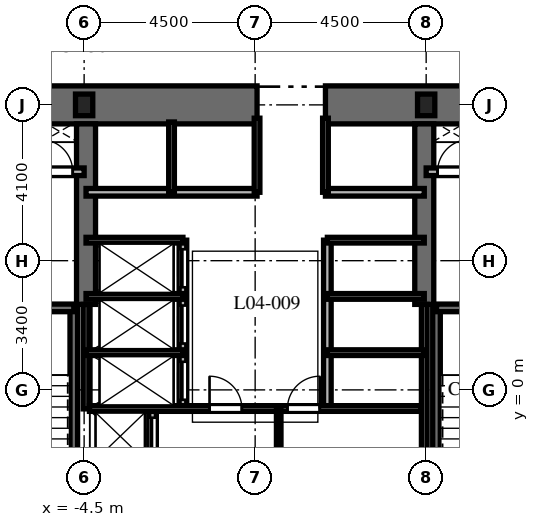
"""IFC4 building model, lengths in metres.
Left out: names, types, materials, properties, quantities, classifications, styles, units other than length and angle.
Written with IfcOpenShell. Run it as: python <this file> out.ifc"""

import sys

from ifc_helpers import new_model, si_unit, direction, frame, frame_2d, origin, origin_2d, place, context, subcontext, project, spatial, rectangle, i_section, extrude, element, fill, save


model = new_model("IFC4")
c1 = context("Model", 3, precision=1e-05, world=origin(), true_north=direction((0.0, 1.0)))
c2 = subcontext(c1, "Body", "Model", "MODEL_VIEW")
j1 = project(units=[si_unit("LENGTHUNIT", "METRE"), si_unit("PLANEANGLEUNIT", "RADIAN")], contexts=[c1])
p1 = place(None, origin())
s1 = spatial("IfcSite", under=j1, at=p1, CompositionType="ELEMENT")
p2 = place(p1, origin())
s2 = spatial("IfcBuilding", under=s1, at=p2, CompositionType="ELEMENT")
p3 = place(p2, frame((0.0, 0.0, 23.4)))
s3 = spatial("IfcBuildingStorey", under=s2, at=p3, CompositionType="ELEMENT", Elevation=23.4)
p4 = place(p3, frame((-9.5, 7.5, 0.0), z_axis=(0.0, 0.0, 1.0), x_axis=(1.0, 0.0, 0.0)))
e1 = element("IfcWall", 1, at=p4, inside=s3, PredefinedType="SHEAR", context=c2, shape_type="SweptSolid", body=[
    extrude(rectangle(XDim=9.55, YDim=1.0, at=frame_2d((4.775, 0.0))), origin(), (0.0, 0.0, 1.0), 4.8),
])
p5 = place(p3, frame((1.85, 7.5, 0.0), z_axis=(0.0, 0.0, 1.0), x_axis=(1.0, 0.0, 0.0)))
e2 = element("IfcWall", 2, at=p5, inside=s3, PredefinedType="SHEAR", context=c2, shape_type="SweptSolid", body=[
    extrude(rectangle(XDim=7.65, YDim=1.0, at=frame_2d((3.825, 0.0))), origin(), (0.0, 0.0, 1.0), 4.8),
])
for number, where, z_axis, x_axis in (
    (3, (-4.45, 2.25, 0.0), (0.0, 0.0, 1.0), (0.0, 1.0, 0.0)),
    (4, (4.45, 2.25, 0.0), (0.0, 0.0, 1.0), (0.0, 1.0, 0.0)),
):
    element("IfcWall", number, at=place(p3, frame(where, z_axis=z_axis, x_axis=x_axis)), inside=s3, PredefinedType="SHEAR", context=c2, shape_type="SweptSolid", body=[
        extrude(rectangle(XDim=4.75, YDim=0.5, at=frame_2d((2.375, 0.0))), origin(), (0.0, 0.0, 1.0), 4.8),
    ])
p6 = place(p3, frame((-4.772, -6.985, 0.0), z_axis=(0.0, 0.0, 1.0), x_axis=(0.0, 1.0, 0.0)))
e5 = element("IfcWall", 5, at=p6, inside=s3, PredefinedType="SHEAR", context=c2, shape_type="SweptSolid", body=[
    extrude(rectangle(XDim=9.143, YDim=0.2, at=frame_2d((4.572, 0.0))), origin(), (0.0, 0.0, 1.0), 4.8),
])
p7 = place(p3, frame((-8.458, 2.158, 0.0), z_axis=(0.0, 0.0, 1.0), x_axis=(1.0, 0.0, 0.0)))
e6 = element("IfcWall", 6, at=p7, inside=s3, PredefinedType="SHEAR", context=c2, shape_type="SweptSolid", body=[
    extrude(rectangle(XDim=3.686, YDim=0.2, at=frame_2d((1.843, 0.0))), origin(), (0.0, 0.0, 1.0), 4.8),
])
p8 = place(p7, frame((1.3, 0.0, 0.0)))
e7 = element("IfcOpeningElement", 7, at=p8, cuts=e6, PredefinedType="OPENING", context=c2, shape_type="SweptSolid", body=[
    extrude(rectangle(XDim=1.0, YDim=2.15, at=frame_2d((0.5, 1.075))), frame((0.0, 0.11, 0.0), z_axis=(0.0, -1.0, 0.0), x_axis=(1.0, 0.0, 0.0)), (0.0, 0.0, 1.0), 0.22),
])
p9 = place(p3, frame((4.772, -6.985, 0.0), z_axis=(0.0, 0.0, 1.0), x_axis=(0.0, 1.0, 0.0)))
e8 = element("IfcWall", 8, at=p9, inside=s3, PredefinedType="SHEAR", context=c2, shape_type="SweptSolid", body=[
    extrude(rectangle(XDim=9.143, YDim=0.2, at=frame_2d((4.572, 0.0))), origin(), (0.0, 0.0, 1.0), 4.8),
])
p10 = place(p3, frame((4.772, 2.158, 0.0), z_axis=(0.0, 0.0, 1.0), x_axis=(1.0, 0.0, 0.0)))
e9 = element("IfcWall", 9, at=p10, inside=s3, PredefinedType="SHEAR", context=c2, shape_type="SweptSolid", body=[
    extrude(rectangle(XDim=3.686, YDim=0.2, at=frame_2d((1.843, 0.0))), origin(), (0.0, 0.0, 1.0), 4.8),
])
p11 = place(p10, frame((1.35, 0.0, 0.0)))
e10 = element("IfcOpeningElement", 10, at=p11, cuts=e9, PredefinedType="OPENING", context=c2, shape_type="SweptSolid", body=[
    extrude(rectangle(XDim=1.0, YDim=2.15, at=frame_2d((0.5, 1.075))), frame((0.0, 0.11, 0.0), z_axis=(0.0, -1.0, 0.0), x_axis=(1.0, 0.0, 0.0)), (0.0, 0.0, 1.0), 0.22),
])
for number, where, z_axis, x_axis in (
    (11, (4.5, 7.5, 0.0), (0.0, 0.0, 1.0), (1.0, 0.0, 0.0)),
    (12, (-4.5, 7.5, 0.0), (0.0, 0.0, 1.0), (1.0, 0.0, 0.0)),
):
    element("IfcColumn", number, at=place(p3, frame(where, z_axis=z_axis, x_axis=x_axis)), inside=s3, PredefinedType="COLUMN", context=c2, shape_type="SweptSolid", body=[
        extrude(i_section(OverallWidth=0.454, OverallDepth=0.569, WebThickness=0.078, FlangeThickness=0.125, at=origin_2d()), origin(), (0.0, 0.0, 1.0), 4.8),
    ])
p12 = place(p3, frame((-8.55, 5.74, 0.0), z_axis=(0.0, 0.0, 1.0), x_axis=(1.0, 0.0, 0.0)))
e13 = element("IfcWall", 13, at=p12, inside=s3, PredefinedType="PARTITIONING", context=c2, shape_type="SweptSolid", body=[
    extrude(rectangle(XDim=4.05, YDim=0.2, at=frame_2d((2.025, 0.0))), origin(), (0.0, 0.0, 1.0), 4.48),
])
p13 = place(p12, frame((0.75, 0.0, 0.0)))
e14 = element("IfcOpeningElement", 14, at=p13, cuts=e13, PredefinedType="OPENING", context=c2, shape_type="SweptSolid", body=[
    extrude(rectangle(XDim=1.1, YDim=2.2, at=frame_2d((0.55, 1.1))), frame((0.0, 0.11, 0.0), z_axis=(0.0, -1.0, 0.0), x_axis=(1.0, 0.0, 0.0)), (0.0, 0.0, 1.0), 0.22),
])
p14 = place(p12, frame((2.9, 0.0, 0.0)))
e15 = element("IfcOpeningElement", 15, at=p14, cuts=e13, PredefinedType="OPENING", context=c2, shape_type="SweptSolid", body=[
    extrude(rectangle(XDim=0.85, YDim=2.03, at=frame_2d((0.425, 1.015))), frame((0.0, 0.11, 0.0), z_axis=(0.0, -1.0, 0.0), x_axis=(1.0, 0.0, 0.0)), (0.0, 0.0, 1.0), 0.22),
])
p15 = place(p3, frame((4.5, 5.74, 0.0), z_axis=(0.0, 0.0, 1.0), x_axis=(1.0, 0.0, 0.0)))
e16 = element("IfcWall", 16, at=p15, inside=s3, PredefinedType="PARTITIONING", context=c2, shape_type="SweptSolid", body=[
    extrude(rectangle(XDim=4.05, YDim=0.2, at=frame_2d((2.025, 0.0))), origin(), (0.0, 0.0, 1.0), 4.48),
])
p16 = place(p15, frame((0.3, 0.0, 0.0)))
e17 = element("IfcOpeningElement", 17, at=p16, cuts=e16, PredefinedType="OPENING", context=c2, shape_type="SweptSolid", body=[
    extrude(rectangle(XDim=0.85, YDim=2.03, at=frame_2d((0.425, 1.015))), frame((0.0, 0.11, 0.0), z_axis=(0.0, -1.0, 0.0), x_axis=(1.0, 0.0, 0.0)), (0.0, 0.0, 1.0), 0.22),
])
p17 = place(p15, frame((2.15, 0.0, 0.0)))
e18 = element("IfcOpeningElement", 18, at=p17, cuts=e16, PredefinedType="OPENING", context=c2, shape_type="SweptSolid", body=[
    extrude(rectangle(XDim=1.1, YDim=2.2, at=frame_2d((0.55, 1.1))), frame((0.0, 0.11, 0.0), z_axis=(0.0, -1.0, 0.0), x_axis=(1.0, 0.0, 0.0)), (0.0, 0.0, 1.0), 0.22),
])
p18 = place(p3, frame((-2.7, -1.972, 0.0), z_axis=(0.0, 0.0, 1.0), x_axis=(0.0, 1.0, 0.0)))
e19 = element("IfcWall", 19, at=p18, inside=s3, PredefinedType="PARTITIONING", context=c2, shape_type="SweptSolid", body=[
    extrude(rectangle(XDim=1.472, YDim=0.2, at=frame_2d((0.736, 0.0))), origin(), (0.0, 0.0, 1.0), 4.48),
])
p19 = place(p18, frame((0.24, 0.0, 0.0)))
e20 = element("IfcOpeningElement", 20, at=p19, cuts=e19, PredefinedType="OPENING", context=c2, shape_type="SweptSolid", body=[
    extrude(rectangle(XDim=1.0, YDim=2.2, at=frame_2d((0.5, 1.1))), frame((0.0, 0.11, 0.0), z_axis=(0.0, -1.0, 0.0), x_axis=(1.0, 0.0, 0.0)), (0.0, 0.0, 1.0), 0.22),
])
p20 = place(p3, frame((-4.45, 5.2, 0.0), z_axis=(0.0, 0.0, 1.0), x_axis=(1.0, 0.0, 0.0)))
e21 = element("IfcWall", 21, at=p20, inside=s3, PredefinedType="PARTITIONING", context=c2, shape_type="SweptSolid", body=[
    extrude(rectangle(XDim=4.5, YDim=0.2, at=frame_2d((2.25, 0.0))), origin(), (0.0, 0.0, 1.0), 4.48),
])
p21 = place(p3, frame((1.85, 5.2, 0.0), z_axis=(0.0, 0.0, 1.0), x_axis=(1.0, 0.0, 0.0)))
e22 = element("IfcWall", 22, at=p21, inside=s3, PredefinedType="PARTITIONING", context=c2, shape_type="SweptSolid", body=[
    extrude(rectangle(XDim=2.6, YDim=0.2, at=frame_2d((1.3, 0.0))), origin(), (0.0, 0.0, 1.0), 4.48),
])
p22 = place(p3, frame((-2.2, 5.2, 0.0), z_axis=(0.0, 0.0, 1.0), x_axis=(0.0, 1.0, 0.0)))
e23 = element("IfcWall", 23, at=p22, inside=s3, PredefinedType="PARTITIONING", context=c2, shape_type="SweptSolid", body=[
    extrude(rectangle(XDim=1.85, YDim=0.15, at=frame_2d((0.925, 0.0))), origin(), (0.0, 0.0, 1.0), 4.48),
])
for number, where, z_axis, x_axis in (
    (24, (0.05, 5.2, 0.0), (0.0, 0.0, 1.0), (0.0, 1.0, 0.0)),
    (25, (1.85, 5.2, 0.0), (0.0, 0.0, 1.0), (0.0, 1.0, 0.0)),
):
    element("IfcWall", number, at=place(p3, frame(where, z_axis=z_axis, x_axis=x_axis)), inside=s3, PredefinedType="PARTITIONING", context=c2, shape_type="SweptSolid", body=[
        extrude(rectangle(XDim=1.95, YDim=0.15, at=frame_2d((0.975, 0.0))), origin(), (0.0, 0.0, 1.0), 4.48),
    ])
p23 = place(p3, frame((-4.45, -0.5, 0.0), z_axis=(0.0, 0.0, 1.0), x_axis=(0.0, 1.0, 0.0)))
e26 = element("IfcWall", 26, at=p23, inside=s3, PredefinedType="PARTITIONING", context=c2, shape_type="SweptSolid", body=[
    extrude(rectangle(XDim=2.75, YDim=0.15, at=frame_2d((1.375, 0.0))), origin(), (0.0, 0.0, 1.0), 4.48),
])
p24 = place(p3, frame((4.45, -1.972, 0.0), z_axis=(0.0, 0.0, 1.0), x_axis=(0.0, 1.0, 0.0)))
e27 = element("IfcWall", 27, at=p24, inside=s3, PredefinedType="PARTITIONING", context=c2, shape_type="SweptSolid", body=[
    extrude(rectangle(XDim=4.222, YDim=0.15, at=frame_2d((2.111, 0.0))), origin(), (0.0, 0.0, 1.0), 4.48),
])
p25 = place(p3, frame((-1.9, -0.5, 0.0), z_axis=(0.0, 0.0, 1.0), x_axis=(0.0, 1.0, 0.0)))
e28 = element("IfcWall", 28, at=p25, inside=s3, PredefinedType="PARTITIONING", context=c2, shape_type="SweptSolid", body=[
    extrude(rectangle(XDim=4.44, YDim=0.2, at=frame_2d((2.22, 0.0))), origin(), (0.0, 0.0, 1.0), 4.48),
])
p26 = place(p25, frame((0.24, 0.0, 0.0)))
e29 = element("IfcOpeningElement", 29, at=p26, cuts=e28, PredefinedType="OPENING", context=c2, shape_type="SweptSolid", body=[
    extrude(rectangle(XDim=1.0, YDim=2.2, at=frame_2d((0.5, 1.1))), frame((0.0, 0.11, 0.0), z_axis=(0.0, -1.0, 0.0), x_axis=(1.0, 0.0, 0.0)), (0.0, 0.0, 1.0), 0.22),
])
p27 = place(p25, frame((1.72, 0.0, 0.0)))
e30 = element("IfcOpeningElement", 30, at=p27, cuts=e28, PredefinedType="OPENING", context=c2, shape_type="SweptSolid", body=[
    extrude(rectangle(XDim=1.0, YDim=2.2, at=frame_2d((0.5, 1.1))), frame((0.0, 0.11, 0.0), z_axis=(0.0, -1.0, 0.0), x_axis=(1.0, 0.0, 0.0)), (0.0, 0.0, 1.0), 0.22),
])
p28 = place(p25, frame((3.2, 0.0, 0.0)))
e31 = element("IfcOpeningElement", 31, at=p28, cuts=e28, PredefinedType="OPENING", context=c2, shape_type="SweptSolid", body=[
    extrude(rectangle(XDim=1.0, YDim=2.2, at=frame_2d((0.5, 1.1))), frame((0.0, 0.11, 0.0), z_axis=(0.0, -1.0, 0.0), x_axis=(1.0, 0.0, 0.0)), (0.0, 0.0, 1.0), 0.22),
])
for number, where, z_axis, x_axis in (
    (32, (-4.45, 3.94, 0.0), (0.0, 0.0, 1.0), (1.0, 0.0, 0.0)),
    (33, (-4.45, 0.98, 0.0), (0.0, 0.0, 1.0), (1.0, 0.0, 0.0)),
    (34, (-4.45, 2.46, 0.0), (0.0, 0.0, 1.0), (1.0, 0.0, 0.0)),
):
    element("IfcWall", number, at=place(p3, frame(where, z_axis=z_axis, x_axis=x_axis)), inside=s3, PredefinedType="PARTITIONING", context=c2, shape_type="SweptSolid", body=[
        extrude(rectangle(XDim=2.55, YDim=0.15, at=frame_2d((1.275, 0.0))), origin(), (0.0, 0.0, 1.0), 4.48),
    ])
p29 = place(p3, frame((1.9, -0.5, 0.0), z_axis=(0.0, 0.0, 1.0), x_axis=(0.0, 1.0, 0.0)))
e35 = element("IfcWall", 35, at=p29, inside=s3, PredefinedType="PARTITIONING", context=c2, shape_type="SweptSolid", body=[
    extrude(rectangle(XDim=4.44, YDim=0.2, at=frame_2d((2.22, 0.0))), origin(), (0.0, 0.0, 1.0), 4.48),
])
for number, where, z_axis, x_axis in (
    (36, (1.9, 3.94, 0.0), (0.0, 0.0, 1.0), (1.0, 0.0, 0.0)),
    (37, (1.9, 0.98, 0.0), (0.0, 0.0, 1.0), (1.0, 0.0, 0.0)),
    (38, (1.9, 2.46, 0.0), (0.0, 0.0, 1.0), (1.0, 0.0, 0.0)),
):
    element("IfcWall", number, at=place(p3, frame(where, z_axis=z_axis, x_axis=x_axis)), inside=s3, PredefinedType="PARTITIONING", context=c2, shape_type="SweptSolid", body=[
        extrude(rectangle(XDim=2.55, YDim=0.15, at=frame_2d((1.275, 0.0))), origin(), (0.0, 0.0, 1.0), 4.48),
    ])
p30 = place(p3, frame((-4.36, -0.49, 0.0), z_axis=(0.0, 0.0, 1.0), x_axis=(1.0, 0.0, 0.0)))
e39 = element("IfcWall", 39, at=p30, inside=s3, PredefinedType="PARTITIONING", context=c2, shape_type="SweptSolid", body=[
    extrude(rectangle(XDim=8.72, YDim=0.15, at=frame_2d((4.36, 0.0))), origin(), (0.0, 0.0, 1.0), 4.48),
])
p31 = place(p30, frame((3.16, 0.0, 0.0)))
e40 = element("IfcOpeningElement", 40, at=p31, cuts=e39, PredefinedType="OPENING", context=c2, shape_type="SweptSolid", body=[
    extrude(rectangle(XDim=0.85, YDim=2.03, at=frame_2d((0.425, 1.015))), frame((0.0, 0.085, 0.0), z_axis=(0.0, -1.0, 0.0), x_axis=(1.0, 0.0, 0.0)), (0.0, 0.0, 1.0), 0.17),
])
p32 = place(p30, frame((5.21, 0.0, 0.0)))
e41 = element("IfcOpeningElement", 41, at=p32, cuts=e39, PredefinedType="OPENING", context=c2, shape_type="SweptSolid", body=[
    extrude(rectangle(XDim=0.85, YDim=2.03, at=frame_2d((0.425, 1.015))), frame((0.0, 0.085, 0.0), z_axis=(0.0, -1.0, 0.0), x_axis=(1.0, 0.0, 0.0)), (0.0, 0.0, 1.0), 0.17),
])
p33 = place(p3, frame((0.62, -1.972, 0.0), z_axis=(0.0, 0.0, 1.0), x_axis=(0.0, 1.0, 0.0)))
e42 = element("IfcWall", 42, at=p33, inside=s3, PredefinedType="PARTITIONING", context=c2, shape_type="SweptSolid", body=[
    extrude(rectangle(XDim=1.472, YDim=0.12, at=frame_2d((0.736, 0.0))), origin(), (0.0, 0.0, 1.0), 4.48),
])
p34 = place(p14, origin())
e43 = element("IfcDoor", 43, at=p34, inside=s3, OperationType="SINGLE_SWING_LEFT", PredefinedType="DOOR", context=c2, shape_type="SweptSolid", body=[
    extrude(rectangle(XDim=0.85, YDim=2.03, at=frame_2d((0.425, 1.015))), frame((0.0, 0.025, 0.0), z_axis=(0.0, -1.0, 0.0), x_axis=(1.0, 0.0, 0.0)), (0.0, 0.0, 1.0), 0.05),
])
fill(e15, e43)
p35 = place(p16, origin())
e44 = element("IfcDoor", 44, at=p35, inside=s3, OperationType="SINGLE_SWING_RIGHT", PredefinedType="DOOR", context=c2, shape_type="SweptSolid", body=[
    extrude(rectangle(XDim=0.85, YDim=2.03, at=frame_2d((0.425, 1.015))), frame((0.0, 0.025, 0.0), z_axis=(0.0, -1.0, 0.0), x_axis=(1.0, 0.0, 0.0)), (0.0, 0.0, 1.0), 0.05),
])
fill(e17, e44)
p36 = place(p19, origin())
e45 = element("IfcDoor", 45, at=p36, inside=s3, OperationType="SLIDING_TO_LEFT", PredefinedType="DOOR", context=c2, shape_type="SweptSolid", body=[
    extrude(rectangle(XDim=1.0, YDim=2.2, at=frame_2d((0.5, 1.1))), frame((0.0, 0.025, 0.0), z_axis=(0.0, -1.0, 0.0), x_axis=(1.0, 0.0, 0.0)), (0.0, 0.0, 1.0), 0.05),
])
fill(e20, e45)
p37 = place(p26, origin())
e46 = element("IfcDoor", 46, at=p37, inside=s3, OperationType="SLIDING_TO_LEFT", PredefinedType="DOOR", context=c2, shape_type="SweptSolid", body=[
    extrude(rectangle(XDim=1.0, YDim=2.2, at=frame_2d((0.5, 1.1))), frame((0.0, 0.025, 0.0), z_axis=(0.0, -1.0, 0.0), x_axis=(1.0, 0.0, 0.0)), (0.0, 0.0, 1.0), 0.05),
])
fill(e29, e46)
p38 = place(p27, origin())
e47 = element("IfcDoor", 47, at=p38, inside=s3, OperationType="SLIDING_TO_LEFT", PredefinedType="DOOR", context=c2, shape_type="SweptSolid", body=[
    extrude(rectangle(XDim=1.0, YDim=2.2, at=frame_2d((0.5, 1.1))), frame((0.0, 0.025, 0.0), z_axis=(0.0, -1.0, 0.0), x_axis=(1.0, 0.0, 0.0)), (0.0, 0.0, 1.0), 0.05),
])
fill(e30, e47)
p39 = place(p28, origin())
e48 = element("IfcDoor", 48, at=p39, inside=s3, OperationType="SLIDING_TO_LEFT", PredefinedType="DOOR", context=c2, shape_type="SweptSolid", body=[
    extrude(rectangle(XDim=1.0, YDim=2.2, at=frame_2d((0.5, 1.1))), frame((0.0, 0.025, 0.0), z_axis=(0.0, -1.0, 0.0), x_axis=(1.0, 0.0, 0.0)), (0.0, 0.0, 1.0), 0.05),
])
fill(e31, e48)
p40 = place(p31, origin())
e49 = element("IfcDoor", 49, at=p40, inside=s3, OperationType="SINGLE_SWING_LEFT", PredefinedType="DOOR", context=c2, shape_type="SweptSolid", body=[
    extrude(rectangle(XDim=0.85, YDim=2.03, at=frame_2d((0.425, 1.015))), frame((0.0, 0.025, 0.0), z_axis=(0.0, -1.0, 0.0), x_axis=(1.0, 0.0, 0.0)), (0.0, 0.0, 1.0), 0.05),
])
fill(e40, e49)
p41 = place(p32, origin())
e50 = element("IfcDoor", 50, at=p41, inside=s3, OperationType="SINGLE_SWING_RIGHT", PredefinedType="DOOR", context=c2, shape_type="SweptSolid", body=[
    extrude(rectangle(XDim=0.85, YDim=2.03, at=frame_2d((0.425, 1.015))), frame((0.0, 0.025, 0.0), z_axis=(0.0, -1.0, 0.0), x_axis=(1.0, 0.0, 0.0)), (0.0, 0.0, 1.0), 0.05),
])
fill(e41, e50)
save(model, sys.argv[1])
